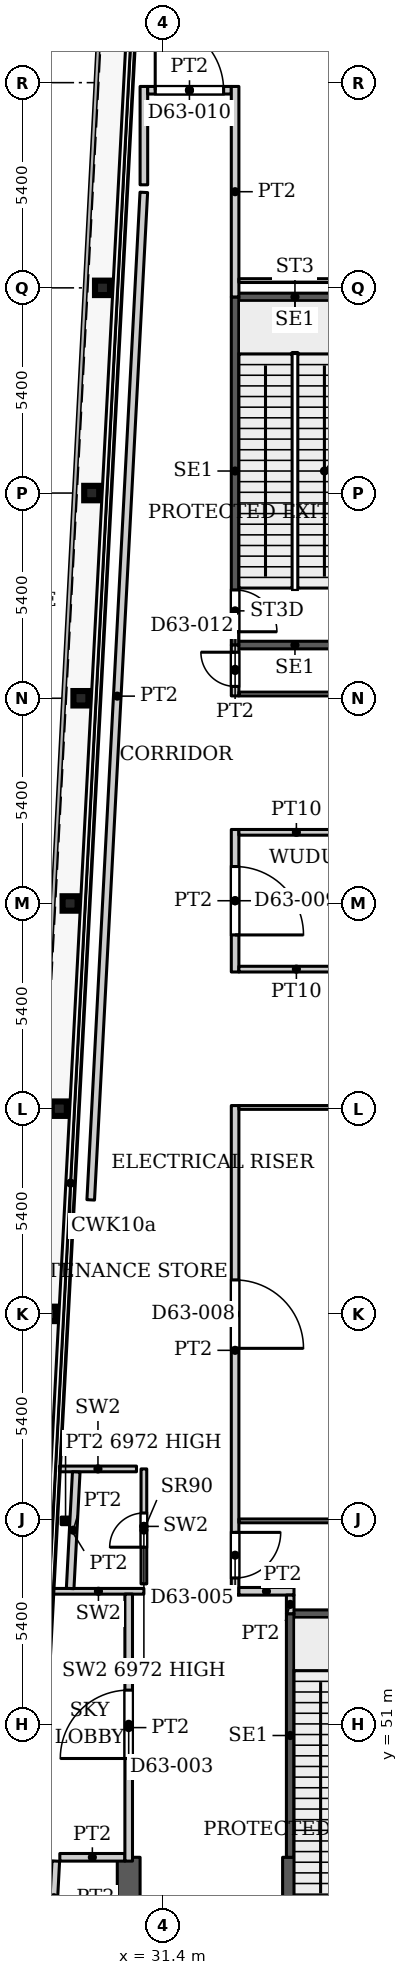
"""IFC4 building model, lengths in metres.
Left out: names, types, materials, properties, quantities, classifications, styles, units other than length and angle.
Written with IfcOpenShell. Run it as: python <this file> out.ifc"""

import sys

from ifc_helpers import new_model, si_unit, direction, frame, frame_2d, origin, origin_2d, place, context, subcontext, project, spatial, rectangle, i_section, extrude, source, transform, mapped, element, fill, save


model = new_model("IFC4")
c1 = context("Model", 3, precision=1e-05, world=origin(), true_north=direction((0.0, 1.0)))
c2 = subcontext(c1, "Body", "Model", "MODEL_VIEW")
j1 = project(units=[si_unit("LENGTHUNIT", "METRE"), si_unit("PLANEANGLEUNIT", "RADIAN")], contexts=[c1])
p1 = place(None, origin())
s1 = spatial("IfcSite", under=j1, at=p1, CompositionType="ELEMENT")
p2 = place(p1, origin())
s2 = spatial("IfcBuilding", under=s1, at=p2, CompositionType="ELEMENT")
p3 = place(p2, frame((0.0, 0.0, 266.9)))
s3 = spatial("IfcBuildingStorey", under=s2, at=p3, CompositionType="ELEMENT", Elevation=266.9)
for number, where, z_axis, x_axis in (
    (1, (28.39, 61.8, 0.0), (0.0, 0.0, 1.0), (1.0, 0.0, 0.0)),
    (2, (28.674, 67.2, 0.0), (0.0, 0.0, 1.0), (1.0, 0.0, 0.0)),
    (3, (28.958, 72.6, 0.0), (0.0, 0.0, 1.0), (1.0, 0.0, 0.0)),
    (4, (29.243, 78.0, 0.0), (0.0, 0.0, 1.0), (1.0, 0.0, 0.0)),
    (5, (29.527, 83.4, 0.0), (0.0, 0.0, 1.0), (1.0, 0.0, 0.0)),
    (6, (29.811, 88.8, 0.0), (0.0, 0.0, 1.0), (1.0, 0.0, 0.0)),
):
    element("IfcColumn", number, at=place(p3, frame(where, z_axis=z_axis, x_axis=x_axis)), inside=s3, PredefinedType="COLUMN", context=c2, shape_type="SweptSolid", body=[
        extrude(i_section(OverallWidth=0.395, OverallDepth=0.38, WebThickness=0.019, FlangeThickness=0.03, FilletRadius=0.011, at=origin_2d()), origin(), (0.0, 0.0, 1.0), 7.8),
    ])
p4 = place(p3, frame((34.75, 29.05, 0.0), z_axis=(0.0, 0.0, 1.0), x_axis=(0.0, 1.0, 0.0)))
e7 = element("IfcWall", 7, at=p4, inside=s3, PredefinedType="SHEAR", context=c2, shape_type="SweptSolid", body=[
    extrude(rectangle(XDim=18.45, YDim=0.4, at=frame_2d((9.225, 0.0))), origin(), (0.0, 0.0, 1.0), 7.8),
])
p5 = place(p4, frame((8.025, 0.0, 0.0)))
e8 = element("IfcOpeningElement", 8, at=p5, cuts=e7, PredefinedType="OPENING", context=c2, shape_type="SweptSolid", body=[
    extrude(rectangle(XDim=1.1, YDim=2.2, at=frame_2d((0.55, 1.1))), frame((0.0, 0.21, 0.0), z_axis=(0.0, -1.0, 0.0), x_axis=(1.0, 0.0, 0.0)), (0.0, 0.0, 1.0), 0.42),
])
p6 = place(p4, frame((10.875, 0.0, 0.0)))
e9 = element("IfcOpeningElement", 9, at=p6, cuts=e7, PredefinedType="OPENING", context=c2, shape_type="SweptSolid", body=[
    extrude(rectangle(XDim=1.1, YDim=2.2, at=frame_2d((0.55, 1.1))), frame((0.0, 0.21, 0.0), z_axis=(0.0, -1.0, 0.0), x_axis=(1.0, 0.0, 0.0)), (0.0, 0.0, 1.0), 0.42),
])
p7 = place(p4, frame((13.725, 0.0, 0.0)))
e10 = element("IfcOpeningElement", 10, at=p7, cuts=e7, PredefinedType="OPENING", context=c2, shape_type="SweptSolid", body=[
    extrude(rectangle(XDim=1.1, YDim=2.2, at=frame_2d((0.55, 1.1))), frame((0.0, 0.21, 0.0), z_axis=(0.0, -1.0, 0.0), x_axis=(1.0, 0.0, 0.0)), (0.0, 0.0, 1.0), 0.42),
])
p8 = place(p4, frame((15.95, 0.0, 0.0)))
e11 = element("IfcOpeningElement", 11, at=p8, cuts=e7, PredefinedType="OPENING", context=c2, shape_type="SweptSolid", body=[
    extrude(rectangle(XDim=1.1, YDim=2.2, at=frame_2d((0.55, 1.1))), frame((0.0, 0.21, 0.0), z_axis=(0.0, -1.0, 0.0), x_axis=(1.0, 0.0, 0.0)), (0.0, 0.0, 1.0), 0.42),
])
p9 = place(p3, frame((30.5, 29.05, 0.0), z_axis=(0.0, 0.0, 1.0), x_axis=(0.0, 1.0, 0.0)))
e12 = element("IfcWall", 12, at=p9, inside=s3, PredefinedType="SHEAR", context=c2, shape_type="SweptSolid", body=[
    extrude(rectangle(XDim=18.45, YDim=0.6, at=frame_2d((9.225, 0.0))), origin(), (0.0, 0.0, 1.0), 7.8),
])
p10 = place(p9, frame((1.5, 0.0, 0.0)))
e13 = element("IfcOpeningElement", 13, at=p10, cuts=e12, PredefinedType="OPENING", context=c2, shape_type="SweptSolid", body=[
    extrude(rectangle(XDim=0.9, YDim=2.2, at=frame_2d((0.45, 1.1))), frame((0.0, 0.31, 0.0), z_axis=(0.0, -1.0, 0.0), x_axis=(1.0, 0.0, 0.0)), (0.0, 0.0, 1.0), 0.62),
])
p11 = place(p9, frame((8.146, 0.0, 0.0)))
e14 = element("IfcOpeningElement", 14, at=p11, cuts=e12, PredefinedType="OPENING", context=c2, shape_type="SweptSolid", body=[
    extrude(rectangle(XDim=0.9, YDim=2.2, at=frame_2d((0.45, 1.1))), frame((0.0, 0.31, 0.0), z_axis=(0.0, -1.0, 0.0), x_axis=(1.0, 0.0, 0.0)), (0.0, 0.0, 1.0), 0.62),
])
p12 = place(p3, frame((34.75, 53.91, 0.0), z_axis=(0.0, 0.0, 1.0), x_axis=(1.0, 0.0, 0.0)))
e15 = element("IfcWall", 15, at=p12, inside=s3, PredefinedType="SHEAR", context=c2, shape_type="SweptSolid", body=[
    extrude(rectangle(XDim=3.15, YDim=0.2, at=frame_2d((1.575, 0.0))), origin(), (0.0, 0.0, 1.0), 7.8),
])
p13 = place(p3, frame((34.75, 47.5, 0.0), z_axis=(0.0, 0.0, 1.0), x_axis=(0.0, 1.0, 0.0)))
e16 = element("IfcWall", 16, at=p13, inside=s3, PredefinedType="SHEAR", context=c2, shape_type="SweptSolid", body=[
    extrude(rectangle(XDim=6.41, YDim=0.2, at=frame_2d((3.205, 0.0))), origin(), (0.0, 0.0, 1.0), 7.8),
])
for number, where, z_axis, x_axis in (
    (17, (33.3, 79.4, 0.0), (0.0, 0.0, 1.0), (1.0, 0.0, 0.0)),
    (18, (33.3, 88.56, 0.0), (0.0, 0.0, 1.0), (1.0, 0.0, 0.0)),
):
    element("IfcWall", number, at=place(p3, frame(where, z_axis=z_axis, x_axis=x_axis)), inside=s3, PredefinedType="SHEAR", context=c2, shape_type="SweptSolid", body=[
        extrude(rectangle(XDim=3.15, YDim=0.2, at=frame_2d((1.575, 0.0))), origin(), (0.0, 0.0, 1.0), 7.8),
    ])
p14 = place(p3, frame((33.3, 79.4, 0.0), z_axis=(0.0, 0.0, 1.0), x_axis=(0.0, 1.0, 0.0)))
e19 = element("IfcWall", 19, at=p14, inside=s3, PredefinedType="SHEAR", context=c2, shape_type="SweptSolid", body=[
    extrude(rectangle(XDim=9.16, YDim=0.2, at=frame_2d((4.58, 0.0))), origin(), (0.0, 0.0, 1.0), 7.8),
])
p15 = place(p14, frame((0.35, 0.0, 0.0)))
e20 = element("IfcOpeningElement", 20, at=p15, cuts=e19, PredefinedType="OPENING", context=c2, shape_type="SweptSolid", body=[
    extrude(rectangle(XDim=1.1, YDim=2.2, at=frame_2d((0.55, 1.1))), frame((0.0, 0.11, 0.0), z_axis=(0.0, -1.0, 0.0), x_axis=(1.0, 0.0, 0.0)), (0.0, 0.0, 1.0), 0.22),
])
p16 = place(p3, frame((28.508, 54.5, 0.0), z_axis=(0.0, 0.0, 1.0), x_axis=(1.0, 0.0, 0.0)))
e21 = element("IfcWall", 21, at=p16, inside=s3, PredefinedType="PARTITIONING", context=c2, shape_type="SweptSolid", body=[
    extrude(rectangle(XDim=2.392, YDim=0.15, at=frame_2d((1.196, 0.0))), origin(), (0.0, 0.0, 1.0), 7.8),
])
p17 = place(p3, frame((30.9, 54.695, 0.0), z_axis=(0.0, 0.0, 1.0), x_axis=(0.0, 1.0, 0.0)))
e22 = element("IfcWall", 22, at=p17, inside=s3, PredefinedType="PARTITIONING", context=c2, shape_type="SweptSolid", body=[
    extrude(rectangle(XDim=3.025, YDim=0.15, at=frame_2d((1.512, 0.0))), origin(), (0.0, 0.0, 1.0), 6.972),
])
p18 = place(p17, frame((0.965, 0.0, 0.0)))
e23 = element("IfcOpeningElement", 23, at=p18, cuts=e22, PredefinedType="OPENING", context=c2, shape_type="SweptSolid", body=[
    extrude(rectangle(XDim=0.9, YDim=2.2, at=frame_2d((0.45, 1.1))), frame((0.0, 0.085, 0.0), z_axis=(0.0, -1.0, 0.0), x_axis=(1.0, 0.0, 0.0)), (0.0, 0.0, 1.0), 0.17),
])
p19 = place(p3, frame((28.678, 57.72, 0.0), z_axis=(0.0, 0.0, 1.0), x_axis=(1.0, 0.0, 0.0)))
e24 = element("IfcWall", 24, at=p19, inside=s3, PredefinedType="PARTITIONING", context=c2, shape_type="SweptSolid", body=[
    extrude(rectangle(XDim=2.027, YDim=0.15, at=frame_2d((1.014, 0.0))), origin(), (0.0, 0.0, 1.0), 7.8),
])
p20 = place(p3, frame((28.48, 45.473, 0.0), z_axis=(0.0, 0.0, 1.0), x_axis=(0.052884210331, 0.99860065106, 0.0)))
e25 = element("IfcWall", 25, at=p20, inside=s3, PredefinedType="PARTITIONING", context=c2, shape_type="SweptSolid", body=[
    extrude(rectangle(XDim=1.93, YDim=0.2, at=frame_2d((0.965, 0.0))), origin(), (0.0, 0.0, 1.0), 7.5),
])
p21 = place(p3, frame((28.688, 47.5, 0.0), z_axis=(0.0, 0.0, 1.0), x_axis=(1.0, 0.0, 0.0)))
e26 = element("IfcWall", 26, at=p21, inside=s3, PredefinedType="PARTITIONING", context=c2, shape_type="SweptSolid", body=[
    extrude(rectangle(XDim=1.712, YDim=0.2, at=frame_2d((0.856, 0.0))), origin(), (0.0, 0.0, 1.0), 7.5),
])
p22 = place(p3, frame((28.724, 56.353, 0.0), z_axis=(0.0, 0.0, 1.0), x_axis=(1.0, 0.0, 0.0)))
e27 = element("IfcWall", 27, at=p22, inside=s3, PredefinedType="PARTITIONING", context=c2, shape_type="SweptSolid", body=[
    extrude(rectangle(XDim=0.23, YDim=0.2, at=frame_2d((0.115, 0.0))), origin(), (0.0, 0.0, 1.0), 6.972),
])
p23 = place(p3, frame((28.96, 54.574, 0.0), z_axis=(0.0, 0.0, 1.0), x_axis=(0.052145785312, 0.998639483034, 0.0)))
e28 = element("IfcWall", 28, at=p23, inside=s3, PredefinedType="PARTITIONING", context=c2, shape_type="SweptSolid", body=[
    extrude(rectangle(XDim=3.071, YDim=0.2, at=frame_2d((1.536, 0.0))), origin(), (0.0, 0.0, 1.0), 7.5),
])
p24 = place(p3, frame((29.501, 64.8, 0.0), z_axis=(0.0, 0.0, 1.0), x_axis=(0.052619165502, 0.998614652117, 0.0)))
e29 = element("IfcWall", 29, at=p24, inside=s3, PredefinedType="PARTITIONING", context=c2, shape_type="SweptSolid", body=[
    extrude(rectangle(XDim=26.549, YDim=0.2, at=frame_2d((13.274, 0.0))), origin(), (0.0, 0.0, 1.0), 7.5),
])
p25 = place(p3, frame((30.5, 47.4, 0.0), z_axis=(0.0, 0.0, 1.0), x_axis=(0.0, 1.0, 0.0)))
e30 = element("IfcWall", 30, at=p25, inside=s3, PredefinedType="PARTITIONING", context=c2, shape_type="SweptSolid", body=[
    extrude(rectangle(XDim=7.026, YDim=0.2, at=frame_2d((3.513, 0.0))), origin(), (0.0, 0.0, 1.0), 7.5),
])
p26 = place(p25, frame((2.7, 0.0, 0.0)))
e31 = element("IfcOpeningElement", 31, at=p26, cuts=e30, PredefinedType="OPENING", context=c2, shape_type="SweptSolid", body=[
    extrude(rectangle(XDim=1.8, YDim=2.1, at=frame_2d((0.9, 1.05))), frame((0.0, 0.11, 0.0), z_axis=(0.0, -1.0, 0.0), x_axis=(1.0, 0.0, 0.0)), (0.0, 0.0, 1.0), 0.22),
])
p27 = place(p3, frame((30.9, 91.512, 0.0), z_axis=(0.0, 0.0, 1.0), x_axis=(0.0, 1.0, 0.0)))
e32 = element("IfcWall", 32, at=p27, inside=s3, PredefinedType="PARTITIONING", context=c2, shape_type="SweptSolid", body=[
    extrude(rectangle(XDim=2.588, YDim=0.2, at=frame_2d((1.294, 0.0))), origin(), (0.0, 0.0, 1.0), 7.5),
])
p28 = place(p3, frame((31.0, 94.0, 0.0), z_axis=(0.0, 0.0, 1.0), x_axis=(1.0, 0.0, 0.0)))
e33 = element("IfcWall", 33, at=p28, inside=s3, PredefinedType="PARTITIONING", context=c2, shape_type="SweptSolid", body=[
    extrude(rectangle(XDim=2.2, YDim=0.2, at=frame_2d((1.1, 0.0))), origin(), (0.0, 0.0, 1.0), 7.5),
])
p29 = place(p28, frame((0.198, 0.0, 0.0)))
e34 = element("IfcOpeningElement", 34, at=p29, cuts=e33, PredefinedType="OPENING", context=c2, shape_type="SweptSolid", body=[
    extrude(rectangle(XDim=1.8, YDim=2.1, at=frame_2d((0.9, 1.05))), frame((0.0, 0.11, 0.0), z_axis=(0.0, -1.0, 0.0), x_axis=(1.0, 0.0, 0.0)), (0.0, 0.0, 1.0), 0.22),
])
p30 = place(p3, frame((33.3, 54.4, 0.0), z_axis=(0.0, 0.0, 1.0), x_axis=(0.0, 1.0, 0.0)))
e35 = element("IfcWall", 35, at=p30, inside=s3, PredefinedType="PARTITIONING", context=c2, shape_type="SweptSolid", body=[
    extrude(rectangle(XDim=12.882, YDim=0.2, at=frame_2d((6.441, 0.0))), origin(), (0.0, 0.0, 1.0), 7.5),
])
p31 = place(p30, frame((0.45, 0.0, 0.0)))
e36 = element("IfcOpeningElement", 36, at=p31, cuts=e35, PredefinedType="OPENING", context=c2, shape_type="SweptSolid", body=[
    extrude(rectangle(XDim=1.2, YDim=2.1, at=frame_2d((0.6, 1.05))), frame((0.0, 0.11, 0.0), z_axis=(0.0, -1.0, 0.0), x_axis=(1.0, 0.0, 0.0)), (0.0, 0.0, 1.0), 0.22),
])
p32 = place(p30, frame((6.493, 0.0, 0.0)))
e37 = element("IfcOpeningElement", 37, at=p32, cuts=e35, PredefinedType="OPENING", context=c2, shape_type="SweptSolid", body=[
    extrude(rectangle(XDim=1.8, YDim=2.1, at=frame_2d((0.9, 1.05))), frame((0.0, 0.11, 0.0), z_axis=(0.0, -1.0, 0.0), x_axis=(1.0, 0.0, 0.0)), (0.0, 0.0, 1.0), 0.22),
])
p33 = place(p3, frame((33.3, 70.797, 0.0), z_axis=(0.0, 0.0, 1.0), x_axis=(0.0, 1.0, 0.0)))
e38 = element("IfcWall", 38, at=p33, inside=s3, PredefinedType="PARTITIONING", context=c2, shape_type="SweptSolid", body=[
    extrude(rectangle(XDim=3.75, YDim=0.2, at=frame_2d((1.875, 0.0))), origin(), (0.0, 0.0, 1.0), 7.5),
])
p34 = place(p33, frame((0.975, 0.0, 0.0)))
e39 = element("IfcOpeningElement", 39, at=p34, cuts=e38, PredefinedType="OPENING", context=c2, shape_type="SweptSolid", body=[
    extrude(rectangle(XDim=1.8, YDim=2.1, at=frame_2d((0.9, 1.05))), frame((0.0, 0.11, 0.0), z_axis=(0.0, -1.0, 0.0), x_axis=(1.0, 0.0, 0.0)), (0.0, 0.0, 1.0), 0.22),
])
p35 = place(p3, frame((33.3, 78.062, 0.0), z_axis=(0.0, 0.0, 1.0), x_axis=(0.0, 1.0, 0.0)))
e40 = element("IfcWall", 40, at=p35, inside=s3, PredefinedType="PARTITIONING", context=c2, shape_type="SweptSolid", body=[
    extrude(rectangle(XDim=1.338, YDim=0.2, at=frame_2d((0.669, 0.0))), origin(), (0.0, 0.0, 1.0), 7.5),
])
p36 = place(p35, frame((0.25, 0.0, 0.0)))
e41 = element("IfcOpeningElement", 41, at=p36, cuts=e40, PredefinedType="OPENING", context=c2, shape_type="SweptSolid", body=[
    extrude(rectangle(XDim=0.9, YDim=2.1, at=frame_2d((0.45, 1.05))), frame((0.0, 0.11, 0.0), z_axis=(0.0, -1.0, 0.0), x_axis=(1.0, 0.0, 0.0)), (0.0, 0.0, 1.0), 0.22),
])
p37 = place(p3, frame((33.3, 88.56, 0.0), z_axis=(0.0, 0.0, 1.0), x_axis=(0.0, 1.0, 0.0)))
e42 = element("IfcWall", 42, at=p37, inside=s3, PredefinedType="PARTITIONING", context=c2, shape_type="SweptSolid", body=[
    extrude(rectangle(XDim=5.54, YDim=0.2, at=frame_2d((2.77, 0.0))), origin(), (0.0, 0.0, 1.0), 7.5),
])
p38 = place(p3, frame((33.4, 54.5, 0.0), z_axis=(0.0, 0.0, 1.0), x_axis=(1.0, 0.0, 0.0)))
e43 = element("IfcWall", 43, at=p38, inside=s3, PredefinedType="PARTITIONING", context=c2, shape_type="SweptSolid", body=[
    extrude(rectangle(XDim=1.45, YDim=0.2, at=frame_2d((0.725, 0.0))), origin(), (0.0, 0.0, 1.0), 7.5),
])
p39 = place(p3, frame((33.4, 56.353, 0.0), z_axis=(0.0, 0.0, 1.0), x_axis=(1.0, 0.0, 0.0)))
e44 = element("IfcWall", 44, at=p39, inside=s3, PredefinedType="PARTITIONING", context=c2, shape_type="SweptSolid", body=[
    extrude(rectangle(XDim=12.57, YDim=0.1, at=frame_2d((6.285, 0.0))), origin(), (0.0, 0.0, 1.0), 6.972),
])
p40 = place(p39, frame((5.55, 0.0, 0.0)))
e45 = element("IfcOpeningElement", 45, at=p40, cuts=e44, PredefinedType="OPENING", context=c2, shape_type="SweptSolid", body=[
    extrude(rectangle(XDim=1.0, YDim=2.1, at=frame_2d((0.5, 1.05))), frame((0.0, 0.06, 0.0), z_axis=(0.0, -1.0, 0.0), x_axis=(1.0, 0.0, 0.0)), (0.0, 0.0, 1.0), 0.12),
])
p41 = place(p3, frame((33.4, 67.232, 0.0), z_axis=(0.0, 0.0, 1.0), x_axis=(1.0, 0.0, 0.0)))
e46 = element("IfcWall", 46, at=p41, inside=s3, PredefinedType="PARTITIONING", context=c2, shape_type="SweptSolid", body=[
    extrude(rectangle(XDim=12.57, YDim=0.1, at=frame_2d((6.285, 0.0))), origin(), (0.0, 0.0, 1.0), 6.972),
])
for number, where, z_axis, x_axis in (
    (47, (33.4, 70.872, 0.0), (0.0, 0.0, 1.0), (1.0, 0.0, 0.0)),
    (48, (33.4, 74.472, 0.0), (0.0, 0.0, 1.0), (1.0, 0.0, 0.0)),
):
    element("IfcWall", number, at=place(p3, frame(where, z_axis=z_axis, x_axis=x_axis)), inside=s3, PredefinedType="PARTITIONING", context=c2, shape_type="SweptSolid", body=[
        extrude(rectangle(XDim=3.025, YDim=0.15, at=frame_2d((1.513, 0.0))), origin(), (0.0, 0.0, 1.0), 7.5),
    ])
p42 = place(p3, frame((33.4, 78.112, 0.0), z_axis=(0.0, 0.0, 1.0), x_axis=(1.0, 0.0, 0.0)))
e49 = element("IfcWall", 49, at=p42, inside=s3, PredefinedType="PARTITIONING", context=c2, shape_type="SweptSolid", body=[
    extrude(rectangle(XDim=12.57, YDim=0.1, at=frame_2d((6.285, 0.0))), origin(), (0.0, 0.0, 1.0), 6.972),
])
p43 = place(p3, frame((33.4, 88.991, 0.0), z_axis=(0.0, 0.0, 1.0), x_axis=(1.0, 0.0, 0.0)))
e50 = element("IfcWall", 50, at=p43, inside=s3, PredefinedType="PARTITIONING", context=c2, shape_type="SweptSolid", body=[
    extrude(rectangle(XDim=12.57, YDim=0.1, at=frame_2d((6.285, 0.0))), origin(), (0.0, 0.0, 1.0), 6.4),
])
p44 = place(p43, frame((5.55, 0.0, 0.0)))
e51 = element("IfcOpeningElement", 51, at=p44, cuts=e50, PredefinedType="OPENING", context=c2, shape_type="SweptSolid", body=[
    extrude(rectangle(XDim=1.0, YDim=2.1, at=frame_2d((0.5, 1.05))), frame((0.0, 0.06, 0.0), z_axis=(0.0, -1.0, 0.0), x_axis=(1.0, 0.0, 0.0)), (0.0, 0.0, 1.0), 0.12),
])
p45 = place(p3, frame((34.75, 53.91, 0.0), z_axis=(0.0, 0.0, 1.0), x_axis=(0.0, 1.0, 0.0)))
e52 = element("IfcWall", 52, at=p45, inside=s3, PredefinedType="PARTITIONING", context=c2, shape_type="SweptSolid", body=[
    extrude(rectangle(XDim=0.49, YDim=0.2, at=frame_2d((0.245, 0.0))), origin(), (0.0, 0.0, 1.0), 7.5),
])
m1 = source(origin(), c2, "Body", "SweptSolid", [
    extrude(rectangle(XDim=0.9, YDim=2.2, at=frame_2d((0.45, 1.1))), frame((0.0, 0.025, 0.0), z_axis=(0.0, -1.0, 0.0), x_axis=(1.0, 0.0, 0.0)), (0.0, 0.0, 1.0), 0.05),
])
p46 = place(p18, origin())
e53 = element("IfcDoor", 53, at=p46, inside=s3, OperationType="SINGLE_SWING_LEFT", PredefinedType="DOOR", context=c2, shape_type="MappedRepresentation", body=[
    mapped(m1, transform((0.0, 0.0, 0.0), x_axis=(1.0, 0.0, 0.0), y_axis=(0.0, 1.0, 0.0), z_axis=(0.0, 0.0, 1.0), scale=1.0)),
])
fill(e23, e53)
m2 = source(origin(), c2, "Body", "SweptSolid", [
    extrude(rectangle(XDim=1.1, YDim=2.2, at=frame_2d((0.55, 1.1))), frame((0.0, 0.025, 0.0), z_axis=(0.0, -1.0, 0.0), x_axis=(1.0, 0.0, 0.0)), (0.0, 0.0, 1.0), 0.05),
])
p47 = place(p15, origin())
e54 = element("IfcDoor", 54, at=p47, inside=s3, OperationType="SINGLE_SWING_RIGHT", PredefinedType="DOOR", context=c2, shape_type="MappedRepresentation", body=[
    mapped(m2, transform((0.0, 0.0, 0.0), x_axis=(1.0, 0.0, 0.0), y_axis=(0.0, 1.0, 0.0), z_axis=(0.0, 0.0, 1.0), scale=1.0)),
])
fill(e20, e54)
m3 = source(origin(), c2, "Body", "SweptSolid", [
    extrude(rectangle(XDim=1.8, YDim=2.1, at=frame_2d((0.9, 1.05))), frame((0.0, 0.025, 0.0), z_axis=(0.0, -1.0, 0.0), x_axis=(1.0, 0.0, 0.0)), (0.0, 0.0, 1.0), 0.05),
])
p48 = place(p26, origin())
e55 = element("IfcDoor", 55, at=p48, inside=s3, OperationType="DOUBLE_DOOR_SINGLE_SWING", PredefinedType="DOOR", context=c2, shape_type="MappedRepresentation", body=[
    mapped(m3, transform((0.0, 0.0, 0.0), x_axis=(1.0, 0.0, 0.0), y_axis=(0.0, 1.0, 0.0), z_axis=(0.0, 0.0, 1.0), scale=1.0)),
])
fill(e31, e55)
m4 = source(origin(), c2, "Body", "SweptSolid", [
    extrude(rectangle(XDim=1.2, YDim=2.1, at=frame_2d((0.6, 1.05))), frame((0.0, 0.025, 0.0), z_axis=(0.0, -1.0, 0.0), x_axis=(1.0, 0.0, 0.0)), (0.0, 0.0, 1.0), 0.05),
])
p49 = place(p31, origin())
e56 = element("IfcDoor", 56, at=p49, inside=s3, OperationType="SINGLE_SWING_RIGHT", PredefinedType="DOOR", context=c2, shape_type="MappedRepresentation", body=[
    mapped(m4, transform((0.0, 0.0, 0.0), x_axis=(1.0, 0.0, 0.0), y_axis=(0.0, 1.0, 0.0), z_axis=(0.0, 0.0, 1.0), scale=1.0)),
])
fill(e36, e56)
p50 = place(p32, origin())
e57 = element("IfcDoor", 57, at=p50, inside=s3, OperationType="DOUBLE_DOOR_SINGLE_SWING", PredefinedType="DOOR", context=c2, shape_type="MappedRepresentation", body=[
    mapped(m3, transform((0.0, 0.0, 0.0), x_axis=(1.0, 0.0, 0.0), y_axis=(0.0, 1.0, 0.0), z_axis=(0.0, 0.0, 1.0), scale=1.0)),
])
fill(e37, e57)
p51 = place(p34, origin())
e58 = element("IfcDoor", 58, at=p51, inside=s3, OperationType="DOUBLE_DOOR_SINGLE_SWING", PredefinedType="DOOR", context=c2, shape_type="MappedRepresentation", body=[
    mapped(m3, transform((0.0, 0.0, 0.0), x_axis=(1.0, 0.0, 0.0), y_axis=(0.0, 1.0, 0.0), z_axis=(0.0, 0.0, 1.0), scale=1.0)),
])
fill(e39, e58)
p52 = place(p29, origin())
e59 = element("IfcDoor", 59, at=p52, inside=s3, OperationType="DOUBLE_DOOR_SINGLE_SWING", PredefinedType="DOOR", context=c2, shape_type="MappedRepresentation", body=[
    mapped(m3, transform((0.0, 0.0, 0.0), x_axis=(1.0, 0.0, 0.0), y_axis=(0.0, 1.0, 0.0), z_axis=(0.0, 0.0, 1.0), scale=1.0)),
])
fill(e34, e59)
m5 = source(origin(), c2, "Body", "SweptSolid", [
    extrude(rectangle(XDim=0.9, YDim=2.1, at=frame_2d((0.45, 1.05))), frame((0.0, 0.025, 0.0), z_axis=(0.0, -1.0, 0.0), x_axis=(1.0, 0.0, 0.0)), (0.0, 0.0, 1.0), 0.05),
])
p53 = place(p36, origin())
e60 = element("IfcDoor", 60, at=p53, inside=s3, OperationType="SINGLE_SWING_LEFT", PredefinedType="DOOR", context=c2, shape_type="MappedRepresentation", body=[
    mapped(m5, transform((0.0, 0.0, 0.0), x_axis=(1.0, 0.0, 0.0), y_axis=(0.0, 1.0, 0.0), z_axis=(0.0, 0.0, 1.0), scale=1.0)),
])
fill(e41, e60)
save(model, sys.argv[1])
